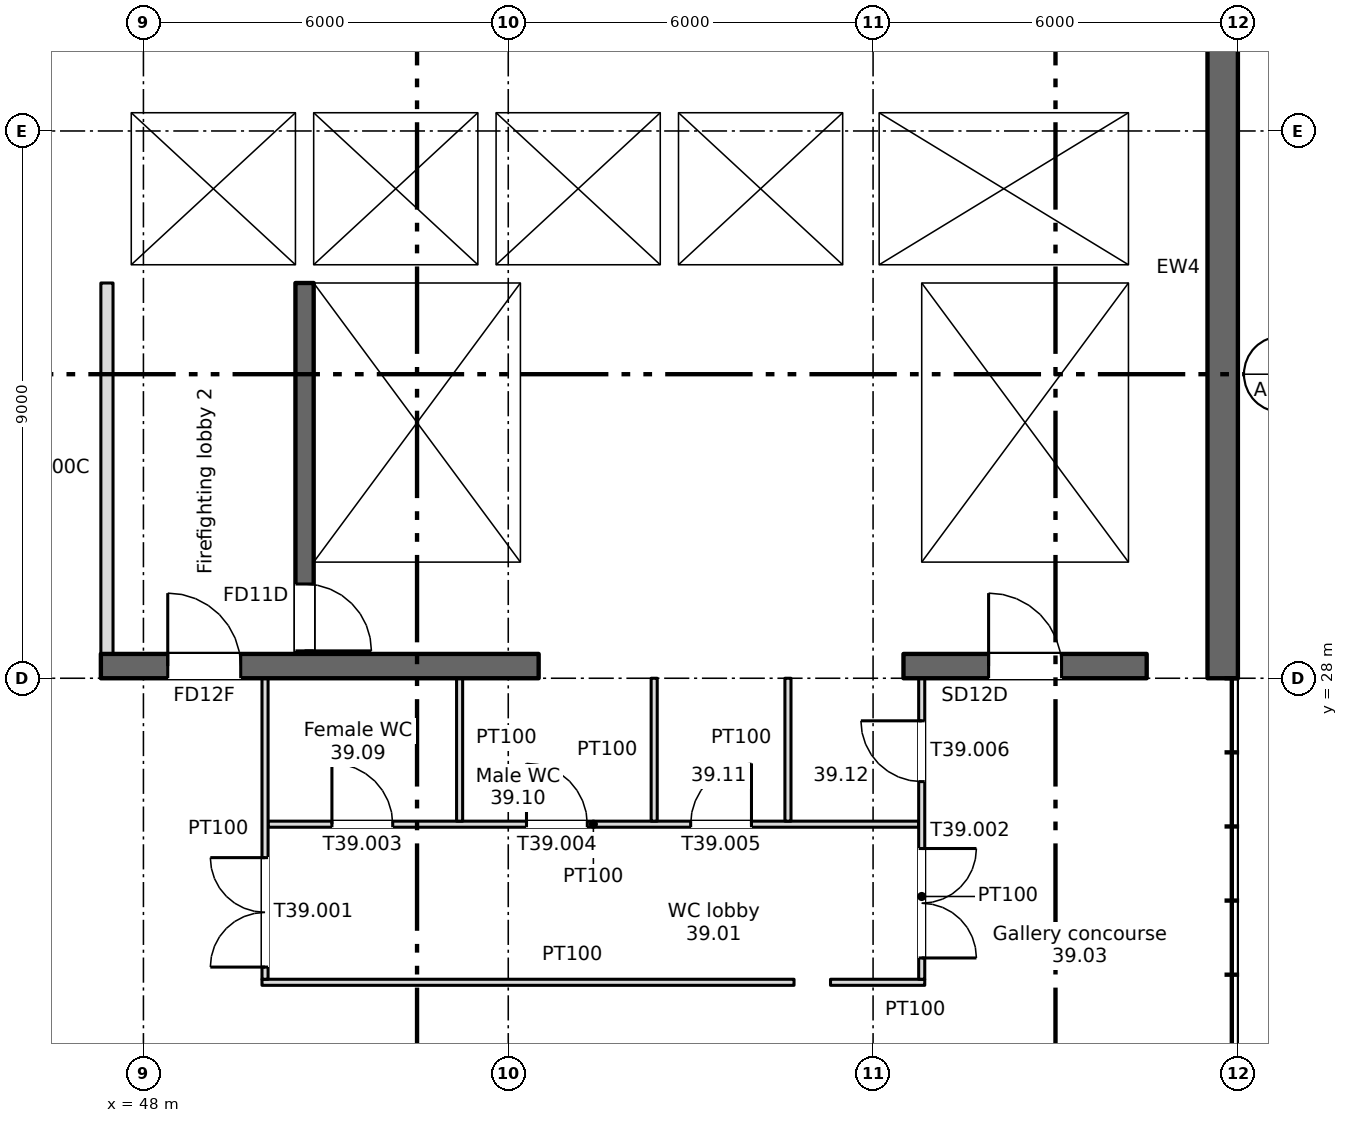
"""IFC4 building model, lengths in metres.
Left out: names, types, materials, properties, quantities, classifications, styles, units other than length and angle.
Written with IfcOpenShell. Run it as: python <this file> out.ifc"""

import sys

from ifc_helpers import new_model, si_unit, direction, frame, frame_2d, origin, place, context, subcontext, project, spatial, rectangle, extrude, element, fill, save


model = new_model("IFC4")
c1 = context("Model", 3, precision=1e-05, world=origin(), true_north=direction((0.0, 1.0)))
c2 = subcontext(c1, "Body", "Model", "MODEL_VIEW")
j1 = project(units=[si_unit("LENGTHUNIT", "METRE"), si_unit("PLANEANGLEUNIT", "RADIAN")], contexts=[c1])
p1 = place(None, origin())
s1 = spatial("IfcSite", under=j1, at=p1, CompositionType="ELEMENT")
p2 = place(p1, origin())
s2 = spatial("IfcBuilding", under=s1, at=p2, CompositionType="ELEMENT")
p3 = place(p2, frame((0.0, 0.0, 265.95)))
s3 = spatial("IfcBuildingStorey", under=s2, at=p3, CompositionType="ELEMENT", Elevation=265.95)
p4 = place(p3, frame((65.75, 28.0, 0.0), z_axis=(0.0, 0.0, 1.0), x_axis=(0.0, 1.0, 0.0)))
e1 = element("IfcWall", 1, at=p4, inside=s3, PredefinedType="SHEAR", context=c2, shape_type="SweptSolid", body=[
    extrude(rectangle(XDim=13.5, YDim=0.5, at=frame_2d((6.75, 0.0))), origin(), (0.0, 0.0, 1.0), 5.4),
])
p5 = place(p3, frame((50.65, 34.5, 0.0), z_axis=(0.0, 0.0, 1.0), x_axis=(0.0, -1.0, 0.0)))
e2 = element("IfcWall", 2, at=p5, inside=s3, PredefinedType="SHEAR", context=c2, shape_type="SweptSolid", body=[
    extrude(rectangle(XDim=6.1, YDim=0.3, at=frame_2d((3.05, 0.0))), origin(), (0.0, 0.0, 1.0), 5.4),
])
p6 = place(p5, frame((4.95, 0.0, 0.0)))
e3 = element("IfcOpeningElement", 3, at=p6, cuts=e2, PredefinedType="OPENING", context=c2, shape_type="SweptSolid", body=[
    extrude(rectangle(XDim=1.1, YDim=2.1, at=frame_2d((0.55, 1.05))), frame((0.0, 0.16, 0.0), z_axis=(0.0, -1.0, 0.0), x_axis=(1.0, 0.0, 0.0)), (0.0, 0.0, 1.0), 0.32),
])
p7 = place(p3, frame((54.35, 28.4, 0.0), z_axis=(0.0, 0.0, 1.0), x_axis=(0.0, 1.0, 0.0)))
e4 = element("IfcWall", 4, at=p7, inside=s3, PredefinedType="SHEAR", context=c2, shape_type="SweptSolid", body=[
    extrude(rectangle(XDim=6.1, YDim=0.3, at=frame_2d((3.05, 0.0))), origin(), (0.0, 0.0, 1.0), 5.4),
])
p8 = place(p3, frame((47.3, 28.2, 0.0), z_axis=(0.0, 0.0, 1.0), x_axis=(1.0, 0.0, 0.0)))
e5 = element("IfcWall", 5, at=p8, inside=s3, PredefinedType="SHEAR", context=c2, shape_type="SweptSolid", body=[
    extrude(rectangle(XDim=7.2, YDim=0.4, at=frame_2d((3.6, 0.0))), origin(), (0.0, 0.0, 1.0), 5.4),
])
p9 = place(p8, frame((1.1, 0.0, 0.0)))
e6 = element("IfcOpeningElement", 6, at=p9, cuts=e5, PredefinedType="OPENING", context=c2, shape_type="SweptSolid", body=[
    extrude(rectangle(XDim=1.2, YDim=2.1, at=frame_2d((0.6, 1.05))), frame((0.0, 0.21, 0.0), z_axis=(0.0, -1.0, 0.0), x_axis=(1.0, 0.0, 0.0)), (0.0, 0.0, 1.0), 0.42),
])
p10 = place(p3, frame((47.3, 34.65, 0.0), z_axis=(0.0, 0.0, 1.0), x_axis=(1.0, 0.0, 0.0)))
e7 = element("IfcWall", 7, at=p10, inside=s3, PredefinedType="SHEAR", context=c2, shape_type="SweptSolid", body=[
    extrude(rectangle(XDim=7.2, YDim=0.3, at=frame_2d((3.6, 0.0))), origin(), (0.0, 0.0, 1.0), 5.4),
])
p11 = place(p10, frame((1.3, 0.0, 0.0)))
e8 = element("IfcOpeningElement", 8, at=p11, cuts=e7, PredefinedType="OPENING", context=c2, shape_type="SweptSolid", body=[
    extrude(rectangle(XDim=1.1, YDim=2.1, at=frame_2d((0.55, 1.05))), frame((0.0, 0.16, 0.0), z_axis=(0.0, -1.0, 0.0), x_axis=(1.0, 0.0, 0.0)), (0.0, 0.0, 1.0), 0.32),
])
for number, where, z_axis, x_axis in (
    (9, (60.65, 28.4, 0.0), (0.0, 0.0, 1.0), (0.0, 1.0, 0.0)),
    (10, (64.35, 28.4, 0.0), (0.0, 0.0, 1.0), (0.0, 1.0, 0.0)),
):
    element("IfcWall", number, at=place(p3, frame(where, z_axis=z_axis, x_axis=x_axis)), inside=s3, PredefinedType="SHEAR", context=c2, shape_type="SweptSolid", body=[
        extrude(rectangle(XDim=6.1, YDim=0.3, at=frame_2d((3.05, 0.0))), origin(), (0.0, 0.0, 1.0), 5.4),
    ])
p12 = place(p3, frame((60.5, 28.2, 0.0), z_axis=(0.0, 0.0, 1.0), x_axis=(1.0, 0.0, 0.0)))
e11 = element("IfcWall", 11, at=p12, inside=s3, PredefinedType="SHEAR", context=c2, shape_type="SweptSolid", body=[
    extrude(rectangle(XDim=4.0, YDim=0.4, at=frame_2d((2.0, 0.0))), origin(), (0.0, 0.0, 1.0), 5.4),
])
p13 = place(p12, frame((1.4, 0.0, 0.0)))
e12 = element("IfcOpeningElement", 12, at=p13, cuts=e11, PredefinedType="OPENING", context=c2, shape_type="SweptSolid", body=[
    extrude(rectangle(XDim=1.2, YDim=2.1, at=frame_2d((0.6, 1.05))), frame((0.0, 0.21, 0.0), z_axis=(0.0, -1.0, 0.0), x_axis=(1.0, 0.0, 0.0)), (0.0, 0.0, 1.0), 0.42),
])
p14 = place(p3, frame((60.5, 34.65, 0.0), z_axis=(0.0, 0.0, 1.0), x_axis=(1.0, 0.0, 0.0)))
e13 = element("IfcWall", 13, at=p14, inside=s3, PredefinedType="SHEAR", context=c2, shape_type="SweptSolid", body=[
    extrude(rectangle(XDim=4.0, YDim=0.3, at=frame_2d((2.0, 0.0))), origin(), (0.0, 0.0, 1.0), 5.4),
])
p15 = place(p3, frame((47.4, 28.4, 0.0), z_axis=(0.0, 0.0, 1.0), x_axis=(0.0, 1.0, 0.0)))
e14 = element("IfcWall", 14, at=p15, inside=s3, PredefinedType="PARTITIONING", context=c2, shape_type="SweptSolid", body=[
    extrude(rectangle(XDim=6.1, YDim=0.2, at=frame_2d((3.05, 0.0))), origin(), (0.0, 0.0, 1.0), 5.4),
])
p16 = place(p3, frame((54.5, 34.65, 0.0), z_axis=(0.0, 0.0, 1.0), x_axis=(1.0, 0.0, 0.0)))
e15 = element("IfcWall", 15, at=p16, inside=s3, PredefinedType="SHEAR", context=c2, shape_type="SweptSolid", body=[
    extrude(rectangle(XDim=5.3, YDim=0.3, at=frame_2d((2.65, 0.0))), origin(), (0.0, 0.0, 1.0), 5.1),
])
p17 = place(p3, frame((50.5, 37.45, 0.0), z_axis=(0.0, 0.0, 1.0), x_axis=(1.0, 0.0, 0.0)))
e16 = element("IfcWall", 16, at=p17, inside=s3, PredefinedType="SHEAR", context=c2, shape_type="SweptSolid", body=[
    extrude(rectangle(XDim=9.3, YDim=0.3, at=frame_2d((4.65, 0.0))), origin(), (0.0, 0.0, 1.0), 5.1),
])
p18 = place(p17, frame((1.1, 0.0, 0.0)))
e17 = element("IfcOpeningElement", 17, at=p18, cuts=e16, PredefinedType="OPENING", context=c2, shape_type="SweptSolid", body=[
    extrude(rectangle(XDim=1.1, YDim=2.1, at=frame_2d((0.55, 1.05))), frame((0.0, 0.16, 0.0), z_axis=(0.0, -1.0, 0.0), x_axis=(1.0, 0.0, 0.0)), (0.0, 0.0, 1.0), 0.32),
])
p19 = place(p17, frame((4.1, 0.0, 0.0)))
e18 = element("IfcOpeningElement", 18, at=p19, cuts=e16, PredefinedType="OPENING", context=c2, shape_type="SweptSolid", body=[
    extrude(rectangle(XDim=1.1, YDim=2.1, at=frame_2d((0.55, 1.05))), frame((0.0, 0.16, 0.0), z_axis=(0.0, -1.0, 0.0), x_axis=(1.0, 0.0, 0.0)), (0.0, 0.0, 1.0), 0.32),
])
p20 = place(p17, frame((7.1, 0.0, 0.0)))
e19 = element("IfcOpeningElement", 19, at=p20, cuts=e16, PredefinedType="OPENING", context=c2, shape_type="SweptSolid", body=[
    extrude(rectangle(XDim=1.1, YDim=2.1, at=frame_2d((0.55, 1.05))), frame((0.0, 0.16, 0.0), z_axis=(0.0, -1.0, 0.0), x_axis=(1.0, 0.0, 0.0)), (0.0, 0.0, 1.0), 0.32),
])
for number, where, z_axis, x_axis in (
    (20, (50.65, 34.8, 0.0), (0.0, 0.0, 1.0), (0.0, 1.0, 0.0)),
    (21, (59.65, 34.8, 0.0), (0.0, 0.0, 1.0), (0.0, 1.0, 0.0)),
    (22, (53.65, 34.8, 0.0), (0.0, 0.0, 1.0), (0.0, 1.0, 0.0)),
    (23, (56.65, 34.8, 0.0), (0.0, 0.0, 1.0), (0.0, 1.0, 0.0)),
):
    element("IfcWall", number, at=place(p3, frame(where, z_axis=z_axis, x_axis=x_axis)), inside=s3, PredefinedType="SHEAR", context=c2, shape_type="SweptSolid", body=[
        extrude(rectangle(XDim=2.5, YDim=0.3, at=frame_2d((1.25, 0.0))), origin(), (0.0, 0.0, 1.0), 5.1),
    ])
p21 = place(p3, frame((47.5, 37.45, 0.0), z_axis=(0.0, 0.0, 1.0), x_axis=(1.0, 0.0, 0.0)))
e24 = element("IfcWall", 24, at=p21, inside=s3, PredefinedType="SHEAR", context=c2, shape_type="SweptSolid", body=[
    extrude(rectangle(XDim=3.0, YDim=0.3, at=frame_2d((1.5, 0.0))), origin(), (0.0, 0.0, 1.0), 5.1),
])
p22 = place(p3, frame((47.65, 34.8, 0.0), z_axis=(0.0, 0.0, 1.0), x_axis=(0.0, 1.0, 0.0)))
e25 = element("IfcWall", 25, at=p22, inside=s3, PredefinedType="SHEAR", context=c2, shape_type="SweptSolid", body=[
    extrude(rectangle(XDim=2.5, YDim=0.3, at=frame_2d((1.25, 0.0))), origin(), (0.0, 0.0, 1.0), 5.1),
])
p23 = place(p3, frame((59.8, 34.65, 0.0), z_axis=(0.0, 0.0, 1.0), x_axis=(1.0, 0.0, 0.0)))
e26 = element("IfcWall", 26, at=p23, inside=s3, PredefinedType="SHEAR", context=c2, shape_type="SweptSolid", body=[
    extrude(rectangle(XDim=0.7, YDim=0.3, at=frame_2d((0.35, 0.0))), origin(), (0.0, 0.0, 1.0), 5.1),
])
p24 = place(p3, frame((59.8, 37.45, 0.0), z_axis=(0.0, 0.0, 1.0), x_axis=(1.0, 0.0, 0.0)))
e27 = element("IfcWall", 27, at=p24, inside=s3, PredefinedType="SHEAR", context=c2, shape_type="SweptSolid", body=[
    extrude(rectangle(XDim=4.7, YDim=0.3, at=frame_2d((2.35, 0.0))), origin(), (0.0, 0.0, 1.0), 5.1),
])
for number, where, z_axis, x_axis in (
    (28, (59.95, 34.8, 0.0), (0.0, 0.0, 1.0), (0.0, 1.0, 0.0)),
    (29, (64.35, 34.8, 0.0), (0.0, 0.0, 1.0), (0.0, 1.0, 0.0)),
):
    element("IfcWall", number, at=place(p3, frame(where, z_axis=z_axis, x_axis=x_axis)), inside=s3, PredefinedType="SHEAR", context=c2, shape_type="SweptSolid", body=[
        extrude(rectangle(XDim=2.5, YDim=0.3, at=frame_2d((1.25, 0.0))), origin(), (0.0, 0.0, 1.0), 5.1),
    ])
p25 = place(p3, frame((49.95, 23.0, 0.0), z_axis=(0.0, 0.0, 1.0), x_axis=(1.0, 0.0, 0.0)))
e30 = element("IfcWall", 30, at=p25, inside=s3, PredefinedType="PARTITIONING", context=c2, shape_type="SweptSolid", body=[
    extrude(rectangle(XDim=8.75, YDim=0.1, at=frame_2d((4.375, 0.0))), origin(), (0.0, 0.0, 1.0), 5.4),
])
p26 = place(p3, frame((59.3, 23.0, 0.0), z_axis=(0.0, 0.0, 1.0), x_axis=(1.0, 0.0, 0.0)))
e31 = element("IfcWall", 31, at=p26, inside=s3, PredefinedType="PARTITIONING", context=c2, shape_type="SweptSolid", body=[
    extrude(rectangle(XDim=1.55, YDim=0.1, at=frame_2d((0.775, 0.0))), origin(), (0.0, 0.0, 1.0), 5.4),
])
p27 = place(p3, frame((50.05, 25.6, 0.0), z_axis=(0.0, 0.0, 1.0), x_axis=(1.0, 0.0, 0.0)))
e32 = element("IfcWall", 32, at=p27, inside=s3, PredefinedType="PARTITIONING", context=c2, shape_type="SweptSolid", body=[
    extrude(rectangle(XDim=10.7, YDim=0.1, at=frame_2d((5.35, 0.0))), origin(), (0.0, 0.0, 1.0), 5.4),
])
p28 = place(p27, frame((1.05, 0.0, 0.0)))
e33 = element("IfcOpeningElement", 33, at=p28, cuts=e32, PredefinedType="OPENING", context=c2, shape_type="SweptSolid", body=[
    extrude(rectangle(XDim=1.0, YDim=2.1, at=frame_2d((0.5, 1.05))), frame((0.0, 0.06, 0.0), z_axis=(0.0, -1.0, 0.0), x_axis=(1.0, 0.0, 0.0)), (0.0, 0.0, 1.0), 0.12),
])
p29 = place(p27, frame((4.25, 0.0, 0.0)))
e34 = element("IfcOpeningElement", 34, at=p29, cuts=e32, PredefinedType="OPENING", context=c2, shape_type="SweptSolid", body=[
    extrude(rectangle(XDim=1.0, YDim=2.1, at=frame_2d((0.5, 1.05))), frame((0.0, 0.06, 0.0), z_axis=(0.0, -1.0, 0.0), x_axis=(1.0, 0.0, 0.0)), (0.0, 0.0, 1.0), 0.12),
])
p30 = place(p27, frame((6.95, 0.0, 0.0)))
e35 = element("IfcOpeningElement", 35, at=p30, cuts=e32, PredefinedType="OPENING", context=c2, shape_type="SweptSolid", body=[
    extrude(rectangle(XDim=1.0, YDim=2.1, at=frame_2d((0.5, 1.05))), frame((0.0, 0.06, 0.0), z_axis=(0.0, -1.0, 0.0), x_axis=(1.0, 0.0, 0.0)), (0.0, 0.0, 1.0), 0.12),
])
p31 = place(p3, frame((50.0, 23.05, 0.0), z_axis=(0.0, 0.0, 1.0), x_axis=(0.0, 1.0, 0.0)))
e36 = element("IfcWall", 36, at=p31, inside=s3, PredefinedType="PARTITIONING", context=c2, shape_type="SweptSolid", body=[
    extrude(rectangle(XDim=4.95, YDim=0.1, at=frame_2d((2.475, 0.0))), origin(), (0.0, 0.0, 1.0), 5.4),
])
p32 = place(p31, frame((0.2, 0.0, 0.0)))
e37 = element("IfcOpeningElement", 37, at=p32, cuts=e36, PredefinedType="OPENING", context=c2, shape_type="SweptSolid", body=[
    extrude(rectangle(XDim=1.8, YDim=2.1, at=frame_2d((0.9, 1.05))), frame((0.0, 0.06, 0.0), z_axis=(0.0, -1.0, 0.0), x_axis=(1.0, 0.0, 0.0)), (0.0, 0.0, 1.0), 0.12),
])
for number, where, z_axis, x_axis in (
    (38, (53.2, 25.65, 0.0), (0.0, 0.0, 1.0), (0.0, 1.0, 0.0)),
    (39, (56.4, 25.65, 0.0), (0.0, 0.0, 1.0), (0.0, 1.0, 0.0)),
    (40, (58.6, 25.65, 0.0), (0.0, 0.0, 1.0), (0.0, 1.0, 0.0)),
):
    element("IfcWall", number, at=place(p3, frame(where, z_axis=z_axis, x_axis=x_axis)), inside=s3, PredefinedType="PARTITIONING", context=c2, shape_type="SweptSolid", body=[
        extrude(rectangle(XDim=2.35, YDim=0.1, at=frame_2d((1.175, 0.0))), origin(), (0.0, 0.0, 1.0), 5.4),
    ])
p33 = place(p3, frame((60.8, 23.05, 0.0), z_axis=(0.0, 0.0, 1.0), x_axis=(0.0, 1.0, 0.0)))
e41 = element("IfcWall", 41, at=p33, inside=s3, PredefinedType="PARTITIONING", context=c2, shape_type="SweptSolid", body=[
    extrude(rectangle(XDim=4.95, YDim=0.1, at=frame_2d((2.475, 0.0))), origin(), (0.0, 0.0, 1.0), 5.4),
])
p34 = place(p33, frame((0.35, 0.0, 0.0)))
e42 = element("IfcOpeningElement", 42, at=p34, cuts=e41, PredefinedType="OPENING", context=c2, shape_type="SweptSolid", body=[
    extrude(rectangle(XDim=1.8, YDim=2.1, at=frame_2d((0.9, 1.05))), frame((0.0, 0.06, 0.0), z_axis=(0.0, -1.0, 0.0), x_axis=(1.0, 0.0, 0.0)), (0.0, 0.0, 1.0), 0.12),
])
p35 = place(p33, frame((3.25, 0.0, 0.0)))
e43 = element("IfcOpeningElement", 43, at=p35, cuts=e41, PredefinedType="OPENING", context=c2, shape_type="SweptSolid", body=[
    extrude(rectangle(XDim=1.0, YDim=2.1, at=frame_2d((0.5, 1.05))), frame((0.0, 0.06, 0.0), z_axis=(0.0, -1.0, 0.0), x_axis=(1.0, 0.0, 0.0)), (0.0, 0.0, 1.0), 0.12),
])
p36 = place(p6, origin())
e44 = element("IfcDoor", 44, at=p36, inside=s3, OperationType="SINGLE_SWING_RIGHT", PredefinedType="DOOR", context=c2, shape_type="SweptSolid", body=[
    extrude(rectangle(XDim=1.1, YDim=2.1, at=frame_2d((0.55, 1.05))), frame((0.0, 0.025, 0.0), z_axis=(0.0, -1.0, 0.0), x_axis=(1.0, 0.0, 0.0)), (0.0, 0.0, 1.0), 0.05),
])
fill(e3, e44)
p37 = place(p13, origin())
e45 = element("IfcDoor", 45, at=p37, inside=s3, OperationType="SINGLE_SWING_LEFT", PredefinedType="DOOR", context=c2, shape_type="SweptSolid", body=[
    extrude(rectangle(XDim=1.2, YDim=2.1, at=frame_2d((0.6, 1.05))), frame((0.0, 0.025, 0.0), z_axis=(0.0, -1.0, 0.0), x_axis=(1.0, 0.0, 0.0)), (0.0, 0.0, 1.0), 0.05),
])
fill(e12, e45)
p38 = place(p9, origin())
e46 = element("IfcDoor", 46, at=p38, inside=s3, OperationType="SINGLE_SWING_LEFT", PredefinedType="DOOR", context=c2, shape_type="SweptSolid", body=[
    extrude(rectangle(XDim=1.2, YDim=2.1, at=frame_2d((0.6, 1.05))), frame((0.0, 0.025, 0.0), z_axis=(0.0, -1.0, 0.0), x_axis=(1.0, 0.0, 0.0)), (0.0, 0.0, 1.0), 0.05),
])
fill(e6, e46)
p39 = place(p18, origin())
e47 = element("IfcDoor", 47, at=p39, inside=s3, OperationType="SLIDING_TO_LEFT", PredefinedType="DOOR", context=c2, shape_type="SweptSolid", body=[
    extrude(rectangle(XDim=1.1, YDim=2.1, at=frame_2d((0.55, 1.05))), frame((0.0, 0.025, 0.0), z_axis=(0.0, -1.0, 0.0), x_axis=(1.0, 0.0, 0.0)), (0.0, 0.0, 1.0), 0.05),
])
fill(e17, e47)
p40 = place(p19, origin())
e48 = element("IfcDoor", 48, at=p40, inside=s3, OperationType="SLIDING_TO_LEFT", PredefinedType="DOOR", context=c2, shape_type="SweptSolid", body=[
    extrude(rectangle(XDim=1.1, YDim=2.1, at=frame_2d((0.55, 1.05))), frame((0.0, 0.025, 0.0), z_axis=(0.0, -1.0, 0.0), x_axis=(1.0, 0.0, 0.0)), (0.0, 0.0, 1.0), 0.05),
])
fill(e18, e48)
p41 = place(p20, origin())
e49 = element("IfcDoor", 49, at=p41, inside=s3, OperationType="SLIDING_TO_LEFT", PredefinedType="DOOR", context=c2, shape_type="SweptSolid", body=[
    extrude(rectangle(XDim=1.1, YDim=2.1, at=frame_2d((0.55, 1.05))), frame((0.0, 0.025, 0.0), z_axis=(0.0, -1.0, 0.0), x_axis=(1.0, 0.0, 0.0)), (0.0, 0.0, 1.0), 0.05),
])
fill(e19, e49)
p42 = place(p11, origin())
e50 = element("IfcDoor", 50, at=p42, inside=s3, OperationType="SLIDING_TO_LEFT", PredefinedType="DOOR", context=c2, shape_type="SweptSolid", body=[
    extrude(rectangle(XDim=1.1, YDim=2.1, at=frame_2d((0.55, 1.05))), frame((0.0, 0.025, 0.0), z_axis=(0.0, -1.0, 0.0), x_axis=(1.0, 0.0, 0.0)), (0.0, 0.0, 1.0), 0.05),
])
fill(e8, e50)
p43 = place(p32, origin())
e51 = element("IfcDoor", 51, at=p43, inside=s3, OperationType="DOUBLE_DOOR_SINGLE_SWING", PredefinedType="DOOR", context=c2, shape_type="SweptSolid", body=[
    extrude(rectangle(XDim=1.8, YDim=2.1, at=frame_2d((0.9, 1.05))), frame((0.0, 0.025, 0.0), z_axis=(0.0, -1.0, 0.0), x_axis=(1.0, 0.0, 0.0)), (0.0, 0.0, 1.0), 0.05),
])
fill(e37, e51)
p44 = place(p34, origin())
e52 = element("IfcDoor", 52, at=p44, inside=s3, OperationType="DOUBLE_DOOR_SINGLE_SWING", PredefinedType="DOOR", context=c2, shape_type="SweptSolid", body=[
    extrude(rectangle(XDim=1.8, YDim=2.1, at=frame_2d((0.9, 1.05))), frame((0.0, 0.025, 0.0), z_axis=(0.0, -1.0, 0.0), x_axis=(1.0, 0.0, 0.0)), (0.0, 0.0, 1.0), 0.05),
])
fill(e42, e52)
p45 = place(p28, origin())
e53 = element("IfcDoor", 53, at=p45, inside=s3, OperationType="SINGLE_SWING_LEFT", PredefinedType="DOOR", context=c2, shape_type="SweptSolid", body=[
    extrude(rectangle(XDim=1.0, YDim=2.1, at=frame_2d((0.5, 1.05))), frame((0.0, 0.025, 0.0), z_axis=(0.0, -1.0, 0.0), x_axis=(1.0, 0.0, 0.0)), (0.0, 0.0, 1.0), 0.05),
])
fill(e33, e53)
p46 = place(p29, origin())
e54 = element("IfcDoor", 54, at=p46, inside=s3, OperationType="SINGLE_SWING_LEFT", PredefinedType="DOOR", context=c2, shape_type="SweptSolid", body=[
    extrude(rectangle(XDim=1.0, YDim=2.1, at=frame_2d((0.5, 1.05))), frame((0.0, 0.025, 0.0), z_axis=(0.0, -1.0, 0.0), x_axis=(1.0, 0.0, 0.0)), (0.0, 0.0, 1.0), 0.05),
])
fill(e34, e54)
p47 = place(p30, origin())
e55 = element("IfcDoor", 55, at=p47, inside=s3, OperationType="SINGLE_SWING_RIGHT", PredefinedType="DOOR", context=c2, shape_type="SweptSolid", body=[
    extrude(rectangle(XDim=1.0, YDim=2.1, at=frame_2d((0.5, 1.05))), frame((0.0, 0.025, 0.0), z_axis=(0.0, -1.0, 0.0), x_axis=(1.0, 0.0, 0.0)), (0.0, 0.0, 1.0), 0.05),
])
fill(e35, e55)
p48 = place(p35, origin())
e56 = element("IfcDoor", 56, at=p48, inside=s3, OperationType="SINGLE_SWING_RIGHT", PredefinedType="DOOR", context=c2, shape_type="SweptSolid", body=[
    extrude(rectangle(XDim=1.0, YDim=2.1, at=frame_2d((0.5, 1.05))), frame((0.0, 0.025, 0.0), z_axis=(0.0, -1.0, 0.0), x_axis=(1.0, 0.0, 0.0)), (0.0, 0.0, 1.0), 0.05),
])
fill(e43, e56)
save(model, sys.argv[1])
